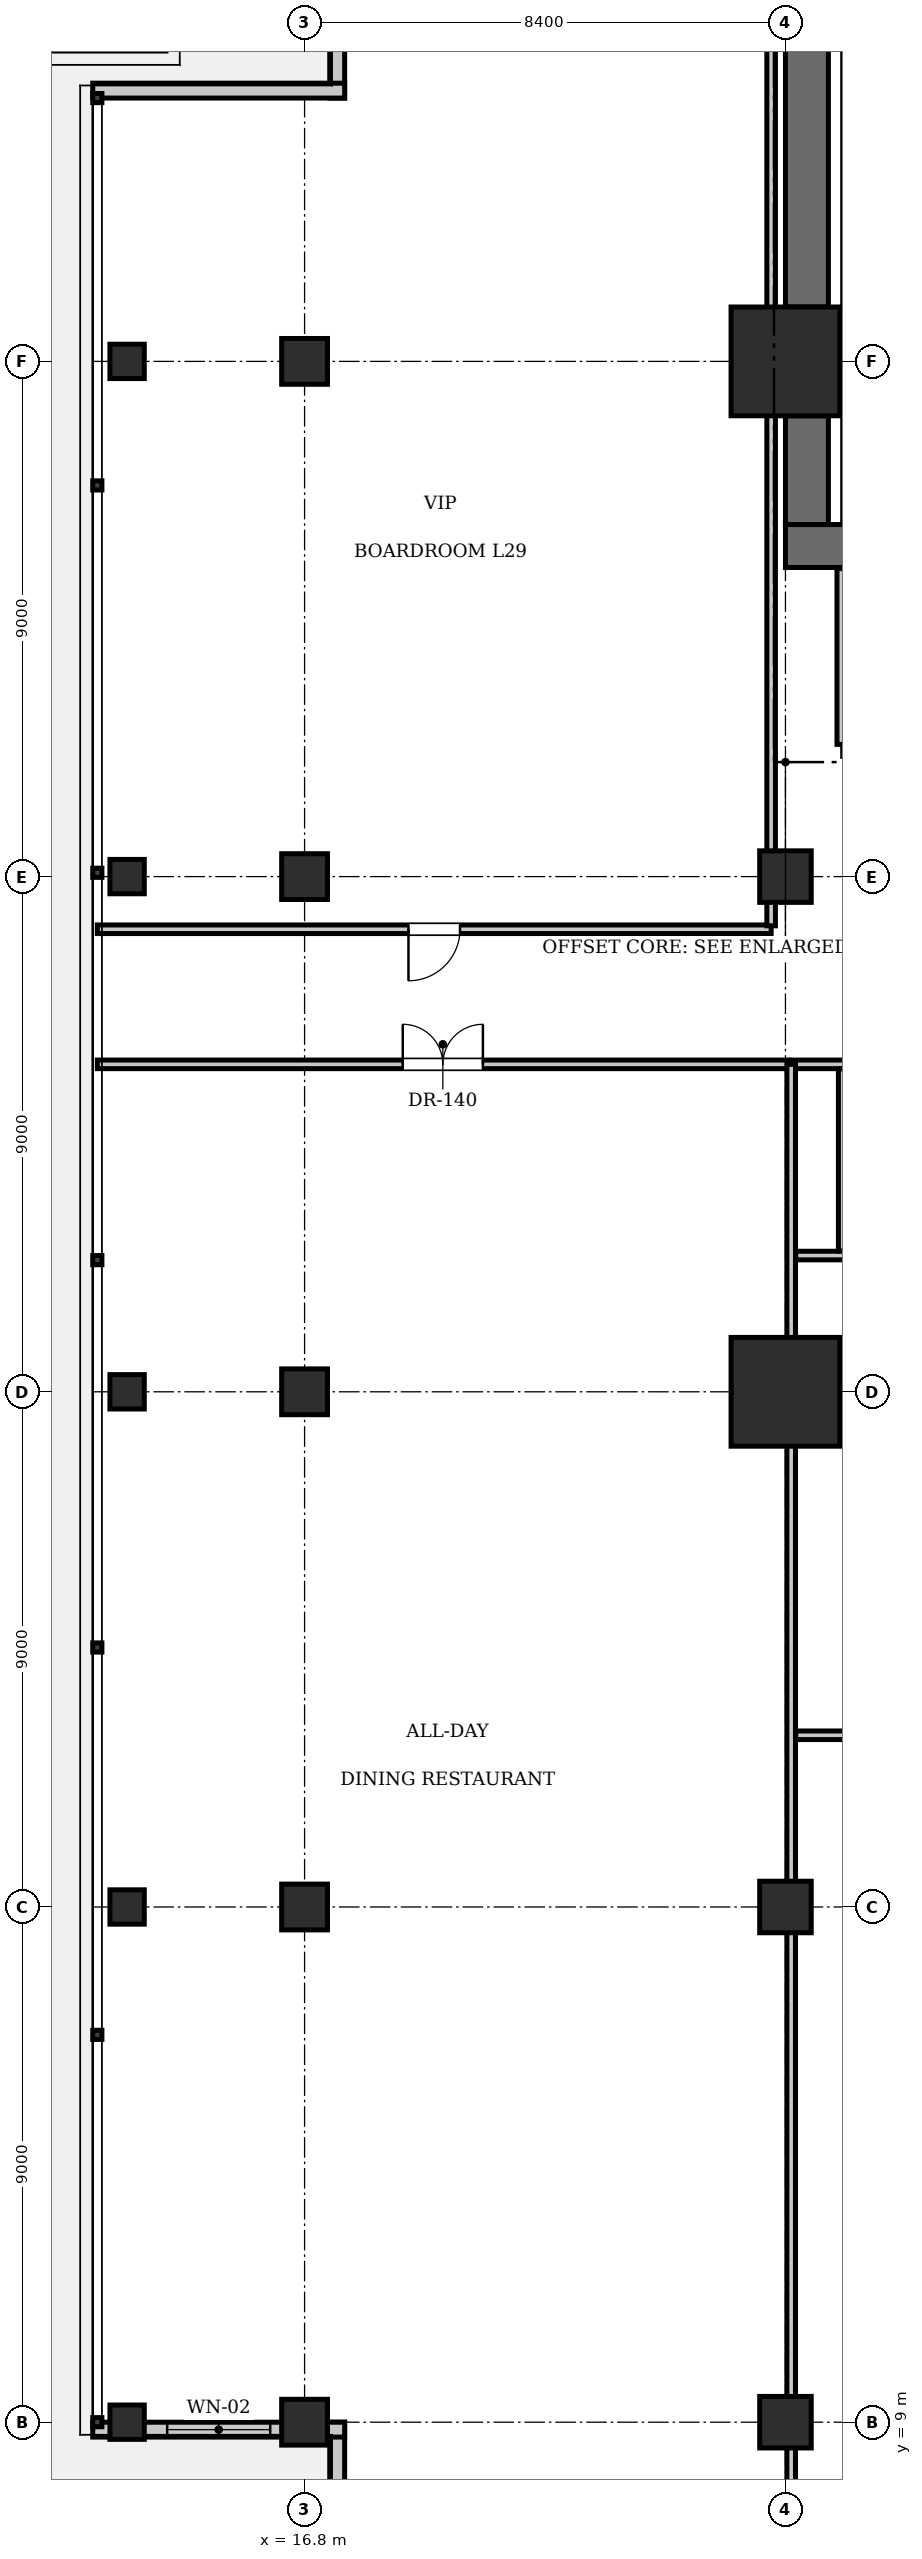
"""IFC4 building model, lengths in metres.
Left out: names, types, materials, properties, quantities, classifications, styles, units other than length and angle.
Written with IfcOpenShell. Run it as: python <this file> out.ifc"""

import sys

from ifc_helpers import new_model, si_unit, direction, frame, frame_2d, origin, origin_2d, place, context, subcontext, project, spatial, rectangle, i_section, extrude, element, fill, save


model = new_model("IFC4")
c1 = context("Model", 3, precision=1e-05, world=origin(), true_north=direction((0.0, 1.0)))
c2 = subcontext(c1, "Body", "Model", "MODEL_VIEW")
j1 = project(units=[si_unit("LENGTHUNIT", "METRE"), si_unit("PLANEANGLEUNIT", "RADIAN")], contexts=[c1])
p1 = place(None, origin())
s1 = spatial("IfcSite", under=j1, at=p1, CompositionType="ELEMENT")
p2 = place(p1, origin())
s2 = spatial("IfcBuilding", under=s1, at=p2, CompositionType="ELEMENT")
p3 = place(p2, frame((0.0, 0.0, 122.5)))
s3 = spatial("IfcBuildingStorey", under=s2, at=p3, CompositionType="ELEMENT", Elevation=122.5)
for number, where, z_axis, x_axis in (
    (1, (25.2, 27.0, 0.0), (0.0, 0.0, 1.0), (1.0, 0.0, 0.0)),
    (2, (25.2, 45.0, 0.0), (0.0, 0.0, 1.0), (1.0, 0.0, 0.0)),
):
    element("IfcColumn", number, at=place(p3, frame(where, z_axis=z_axis, x_axis=x_axis)), inside=s3, PredefinedType="COLUMN", context=c2, shape_type="SweptSolid", body=[
        extrude(rectangle(XDim=1.9, YDim=1.9, at=origin_2d()), origin(), (0.0, 0.0, 1.0), 4.9),
    ])
p4 = place(p3, frame((25.2, 41.775, 0.0), z_axis=(0.0, 0.0, 1.0), x_axis=(1.0, 0.0, 0.0)))
e3 = element("IfcWall", 3, at=p4, inside=s3, PredefinedType="SHEAR", context=c2, shape_type="SweptSolid", body=[
    extrude(rectangle(XDim=6.8, YDim=0.75, at=frame_2d((3.4, 0.0))), origin(), (0.0, 0.0, 1.0), 4.9),
])
p5 = place(p4, frame((1.65, 0.0, 0.0)))
e4 = element("IfcOpeningElement", 4, at=p5, cuts=e3, PredefinedType="OPENING", context=c2, shape_type="SweptSolid", body=[
    extrude(rectangle(XDim=1.15, YDim=2.15, at=frame_2d((0.575, 1.075))), frame((0.0, 0.385, 0.0), z_axis=(0.0, -1.0, 0.0), x_axis=(1.0, 0.0, 0.0)), (0.0, 0.0, 1.0), 0.77),
])
p6 = place(p4, frame((5.15, 0.0, 0.0)))
e5 = element("IfcOpeningElement", 5, at=p6, cuts=e3, PredefinedType="OPENING", context=c2, shape_type="SweptSolid", body=[
    extrude(rectangle(XDim=1.1, YDim=2.2, at=frame_2d((0.55, 1.1))), frame((0.0, 0.385, 0.0), z_axis=(0.0, -1.0, 0.0), x_axis=(1.0, 0.0, 0.0)), (0.0, 0.0, 1.0), 0.77),
])
p7 = place(p3, frame((25.575, 42.15, 0.0), z_axis=(0.0, 0.0, 1.0), x_axis=(0.0, 1.0, 0.0)))
e6 = element("IfcWall", 6, at=p7, inside=s3, PredefinedType="SHEAR", context=c2, shape_type="SweptSolid", body=[
    extrude(rectangle(XDim=1.9, YDim=0.75, at=frame_2d((0.95, 0.0))), origin(), (0.0, 0.0, 1.0), 4.9),
])
p8 = place(p3, frame((25.575, 45.95, 0.0), z_axis=(0.0, 0.0, 1.0), x_axis=(0.0, 1.0, 0.0)))
e7 = element("IfcWall", 7, at=p8, inside=s3, PredefinedType="SHEAR", context=c2, shape_type="SweptSolid", body=[
    extrude(rectangle(XDim=7.3, YDim=0.75, at=frame_2d((3.65, 0.0))), origin(), (0.0, 0.0, 1.0), 4.9),
])
for number, where, z_axis, x_axis in (
    (8, (25.2, 36.0, 0.0), (0.0, 0.0, 1.0), (1.0, 0.0, 0.0)),
    (9, (25.2, 18.0, 0.0), (0.0, 0.0, 1.0), (1.0, 0.0, 0.0)),
    (10, (25.2, 9.0, 0.0), (0.0, 0.0, 1.0), (1.0, 0.0, 0.0)),
):
    element("IfcColumn", number, at=place(p3, frame(where, z_axis=z_axis, x_axis=x_axis)), inside=s3, PredefinedType="COLUMN", context=c2, shape_type="SweptSolid", body=[
        extrude(rectangle(XDim=0.9, YDim=0.9, at=origin_2d()), origin(), (0.0, 0.0, 1.0), 4.9),
    ])
for number, where, z_axis, x_axis in (
    (11, (16.8, 9.0, 0.0), (0.0, 0.0, 1.0), (1.0, 0.0, 0.0)),
    (12, (16.8, 18.0, 0.0), (0.0, 0.0, 1.0), (1.0, 0.0, 0.0)),
    (13, (16.8, 27.0, 0.0), (0.0, 0.0, 1.0), (1.0, 0.0, 0.0)),
    (14, (16.8, 36.0, 0.0), (0.0, 0.0, 1.0), (1.0, 0.0, 0.0)),
    (15, (16.8, 45.0, 0.0), (0.0, 0.0, 1.0), (1.0, 0.0, 0.0)),
):
    element("IfcColumn", number, at=place(p3, frame(where, z_axis=z_axis, x_axis=x_axis)), inside=s3, PredefinedType="COLUMN", context=c2, shape_type="SweptSolid", body=[
        extrude(rectangle(XDim=0.8, YDim=0.8, at=origin_2d()), origin(), (0.0, 0.0, 1.0), 4.9),
    ])
for number, where, z_axis, x_axis in (
    (16, (13.7, 9.0, -0.24), (0.0, 0.0, 1.0), (1.0, 0.0, 0.0)),
    (17, (13.7, 18.0, -0.24), (0.0, 0.0, 1.0), (1.0, 0.0, 0.0)),
    (18, (13.7, 27.0, -0.24), (0.0, 0.0, 1.0), (1.0, 0.0, 0.0)),
    (19, (13.7, 36.0, -0.24), (0.0, 0.0, 1.0), (1.0, 0.0, 0.0)),
    (20, (13.7, 45.0, -0.24), (0.0, 0.0, 1.0), (1.0, 0.0, 0.0)),
):
    element("IfcColumn", number, at=place(p3, frame(where, z_axis=z_axis, x_axis=x_axis)), inside=s3, PredefinedType="COLUMN", context=c2, shape_type="SweptSolid", body=[
        extrude(i_section(OverallWidth=0.6, OverallDepth=0.6, WebThickness=0.025, FlangeThickness=0.038, at=origin_2d()), origin(), (0.0, 0.0, 1.0), 5.14),
    ])
p9 = place(p3, frame((17.37, 4.6, 0.0), z_axis=(0.0, 0.0, 1.0), x_axis=(0.0, 1.0, 0.0)))
e21 = element("IfcWall", 21, at=p9, inside=s3, PredefinedType="SOLIDWALL", context=c2, shape_type="SweptSolid", body=[
    extrude(rectangle(XDim=4.4, YDim=0.26, at=frame_2d((2.2, 0.0))), origin(), (0.0, 0.0, 1.0), 4.66),
])
p10 = place(p3, frame((17.5, 8.87, 0.0), z_axis=(0.0, 0.0, 1.0), x_axis=(-1.0, 0.0, 0.0)))
e22 = element("IfcWall", 22, at=p10, inside=s3, PredefinedType="SOLIDWALL", context=c2, shape_type="SweptSolid", body=[
    extrude(rectangle(XDim=4.4, YDim=0.26, at=frame_2d((2.2, 0.0))), origin(), (0.0, 0.0, 1.0), 4.048),
])
p11 = place(p10, frame((1.3, 0.0, 0.9)))
e23 = element("IfcOpeningElement", 23, at=p11, cuts=e22, PredefinedType="OPENING", context=c2, shape_type="SweptSolid", body=[
    extrude(rectangle(XDim=1.8, YDim=2.1, at=frame_2d((0.9, 1.05))), frame((0.0, 0.14, 0.0), z_axis=(0.0, -1.0, 0.0), x_axis=(1.0, 0.0, 0.0)), (0.0, 0.0, 1.0), 0.28),
])
for number, where, z_axis, x_axis in (
    (24, (17.37, 49.6, 0.0), (0.0, 0.0, 1.0), (0.0, 1.0, 0.0)),
    (25, (13.1, 49.73, 0.0), (0.0, 0.0, 1.0), (1.0, 0.0, 0.0)),
):
    element("IfcWall", number, at=place(p3, frame(where, z_axis=z_axis, x_axis=x_axis)), inside=s3, PredefinedType="SOLIDWALL", context=c2, shape_type="SweptSolid", body=[
        extrude(rectangle(XDim=4.4, YDim=0.26, at=frame_2d((2.2, 0.0))), origin(), (0.0, 0.0, 1.0), 4.66),
    ])
p12 = place(p3, frame((26.2, 38.2, 0.0), z_axis=(0.0, 0.0, 1.0), x_axis=(1.0, 0.0, 0.0)))
e26 = element("IfcWall", 26, at=p12, inside=s3, PredefinedType="PARTITIONING", context=c2, shape_type="SweptSolid", body=[
    extrude(rectangle(XDim=5.8, YDim=0.2, at=frame_2d((2.9, 0.0))), origin(), (0.0, 0.0, 1.0), 4.66),
])
p13 = place(p12, frame((2.3, 0.0, 0.0)))
e27 = element("IfcOpeningElement", 27, at=p13, cuts=e26, PredefinedType="OPENING", context=c2, shape_type="SweptSolid", body=[
    extrude(rectangle(XDim=1.15, YDim=2.15, at=frame_2d((0.575, 1.075))), frame((0.0, 0.11, 0.0), z_axis=(0.0, -1.0, 0.0), x_axis=(1.0, 0.0, 0.0)), (0.0, 0.0, 1.0), 0.22),
])
p14 = place(p3, frame((26.2, 38.31, 0.0), z_axis=(0.0, 0.0, 1.0), x_axis=(0.0, 1.0, 0.0)))
e28 = element("IfcWall", 28, at=p14, inside=s3, PredefinedType="PARTITIONING", context=c2, shape_type="SweptSolid", body=[
    extrude(rectangle(XDim=3.07, YDim=0.2, at=frame_2d((1.535, 0.0))), origin(), (0.0, 0.0, 1.0), 4.66),
])
p15 = place(p3, frame((25.3, 32.72, 0.0), z_axis=(0.0, 0.0, 1.0), x_axis=(1.0, 0.0, 0.0)))
e29 = element("IfcWall", 29, at=p15, inside=s3, PredefinedType="PARTITIONING", context=c2, shape_type="SweptSolid", body=[
    extrude(rectangle(XDim=3.88, YDim=0.15, at=frame_2d((1.94, 0.0))), origin(), (0.0, 0.0, 1.0), 4.66),
])
p16 = place(p15, frame((1.2, 0.0, 0.0)))
e30 = element("IfcOpeningElement", 30, at=p16, cuts=e29, PredefinedType="OPENING", context=c2, shape_type="SweptSolid", body=[
    extrude(rectangle(XDim=0.9, YDim=2.1, at=frame_2d((0.45, 1.05))), frame((0.0, 0.085, 0.0), z_axis=(0.0, -1.0, 0.0), x_axis=(1.0, 0.0, 0.0)), (0.0, 0.0, 1.0), 0.17),
])
p17 = place(p3, frame((25.38, 29.38, 0.0), z_axis=(0.0, 0.0, 1.0), x_axis=(1.0, 0.0, 0.0)))
e31 = element("IfcWall", 31, at=p17, inside=s3, PredefinedType="PARTITIONING", context=c2, shape_type="SweptSolid", body=[
    extrude(rectangle(XDim=6.54, YDim=0.15, at=frame_2d((3.27, 0.0))), origin(), (0.0, 0.0, 1.0), 4.66),
])
p18 = place(p3, frame((26.2, 29.46, 0.0), z_axis=(0.0, 0.0, 1.0), x_axis=(0.0, 1.0, 0.0)))
e32 = element("IfcWall", 32, at=p18, inside=s3, PredefinedType="PARTITIONING", context=c2, shape_type="SweptSolid", body=[
    extrude(rectangle(XDim=3.18, YDim=0.15, at=frame_2d((1.59, 0.0))), origin(), (0.0, 0.0, 1.0), 4.66),
])
p19 = place(p3, frame((25.38, 21.0, 0.0), z_axis=(0.0, 0.0, 1.0), x_axis=(1.0, 0.0, 0.0)))
e33 = element("IfcWall", 33, at=p19, inside=s3, PredefinedType="PARTITIONING", context=c2, shape_type="SweptSolid", body=[
    extrude(rectangle(XDim=10.06, YDim=0.15, at=frame_2d((5.03, 0.0))), origin(), (0.0, 0.0, 1.0), 4.66),
])
p20 = place(p19, frame((7.2, 0.0, 0.0)))
e34 = element("IfcOpeningElement", 34, at=p20, cuts=e33, PredefinedType="OPENING", context=c2, shape_type="SweptSolid", body=[
    extrude(rectangle(XDim=1.6, YDim=2.3, at=frame_2d((0.8, 1.15))), frame((0.0, 0.085, 0.0), z_axis=(0.0, -1.0, 0.0), x_axis=(1.0, 0.0, 0.0)), (0.0, 0.0, 1.0), 0.17),
])
p21 = place(p3, frame((13.18, 32.72, 0.0), z_axis=(0.0, 0.0, 1.0), x_axis=(1.0, 0.0, 0.0)))
e35 = element("IfcWall", 35, at=p21, inside=s3, PredefinedType="PARTITIONING", context=c2, shape_type="SweptSolid", body=[
    extrude(rectangle(XDim=12.07, YDim=0.15, at=frame_2d((6.035, 0.0))), origin(), (0.0, 0.0, 1.0), 4.66),
])
p22 = place(p21, frame((5.335, 0.0, 0.0)))
e36 = element("IfcOpeningElement", 36, at=p22, cuts=e35, PredefinedType="OPENING", context=c2, shape_type="SweptSolid", body=[
    extrude(rectangle(XDim=1.4, YDim=2.2, at=frame_2d((0.7, 1.1))), frame((0.0, 0.085, 0.0), z_axis=(0.0, -1.0, 0.0), x_axis=(1.0, 0.0, 0.0)), (0.0, 0.0, 1.0), 0.17),
])
p23 = place(p3, frame((25.3, 4.68, 0.0), z_axis=(0.0, 0.0, 1.0), x_axis=(0.0, 1.0, 0.0)))
e37 = element("IfcWall", 37, at=p23, inside=s3, PredefinedType="PARTITIONING", context=c2, shape_type="SweptSolid", body=[
    extrude(rectangle(XDim=28.04, YDim=0.15, at=frame_2d((14.02, 0.0))), origin(), (0.0, 0.0, 1.0), 4.048),
])
p24 = place(p3, frame((13.18, 35.08, 0.0), z_axis=(0.0, 0.0, 1.0), x_axis=(1.0, 0.0, 0.0)))
e38 = element("IfcWall", 38, at=p24, inside=s3, PredefinedType="PARTITIONING", context=c2, shape_type="SweptSolid", body=[
    extrude(rectangle(XDim=11.77, YDim=0.15, at=frame_2d((5.885, 0.0))), origin(), (0.0, 0.0, 1.0), 4.66),
])
p25 = place(p24, frame((5.435, 0.0, 0.0)))
e39 = element("IfcOpeningElement", 39, at=p25, cuts=e38, PredefinedType="OPENING", context=c2, shape_type="SweptSolid", body=[
    extrude(rectangle(XDim=0.9, YDim=2.1, at=frame_2d((0.45, 1.05))), frame((0.0, 0.085, 0.0), z_axis=(0.0, -1.0, 0.0), x_axis=(1.0, 0.0, 0.0)), (0.0, 0.0, 1.0), 0.17),
])
p26 = place(p3, frame((24.95, 35.14, 0.0), z_axis=(0.0, 0.0, 1.0), x_axis=(0.0, 1.0, 0.0)))
e40 = element("IfcWall", 40, at=p26, inside=s3, PredefinedType="PARTITIONING", context=c2, shape_type="SweptSolid", body=[
    extrude(rectangle(XDim=18.78, YDim=0.15, at=frame_2d((9.39, 0.0))), origin(), (0.0, 0.0, 1.0), 4.66),
])
p27 = place(p11, origin())
e41 = element("IfcWindow", 41, at=p27, inside=s3, PartitioningType="SINGLE_PANEL", PredefinedType="WINDOW", context=c2, shape_type="SweptSolid", body=[
    extrude(rectangle(XDim=1.8, YDim=2.1, at=frame_2d((0.9, 1.05))), frame((0.0, 0.03, 0.0), z_axis=(0.0, -1.0, 0.0), x_axis=(1.0, 0.0, 0.0)), (0.0, 0.0, 1.0), 0.06),
])
fill(e23, e41)
p28 = place(p22, origin())
e42 = element("IfcDoor", 42, at=p28, inside=s3, OperationType="DOUBLE_DOOR_SINGLE_SWING", PredefinedType="DOOR", context=c2, shape_type="SweptSolid", body=[
    extrude(rectangle(XDim=1.4, YDim=2.2, at=frame_2d((0.7, 1.1))), frame((0.0, 0.025, 0.0), z_axis=(0.0, -1.0, 0.0), x_axis=(1.0, 0.0, 0.0)), (0.0, 0.0, 1.0), 0.05),
])
fill(e36, e42)
p29 = place(p25, frame((0.9, 0.0, 0.0), z_axis=(0.0, 0.0, 1.0), x_axis=(-1.0, 0.0, 0.0)))
e43 = element("IfcDoor", 43, at=p29, inside=s3, OperationType="SINGLE_SWING_RIGHT", PredefinedType="DOOR", context=c2, shape_type="SweptSolid", body=[
    extrude(rectangle(XDim=0.9, YDim=2.1, at=frame_2d((0.45, 1.05))), frame((0.0, 0.025, 0.0), z_axis=(0.0, -1.0, 0.0), x_axis=(1.0, 0.0, 0.0)), (0.0, 0.0, 1.0), 0.05),
])
fill(e39, e43)
save(model, sys.argv[1])
